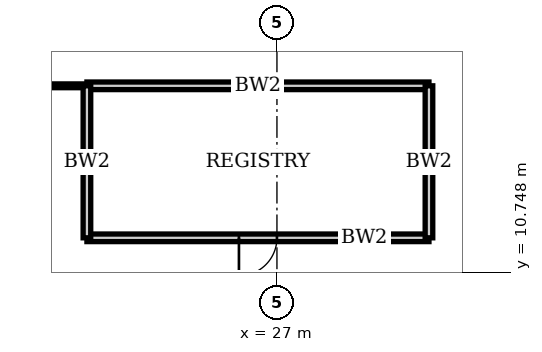
"""IFC4 building model, lengths in metres.
Left out: names, types, materials, properties, quantities, classifications, styles, units other than length and angle.
Written with IfcOpenShell. Run it as: python <this file> out.ifc"""

import sys

from ifc_helpers import new_model, si_unit, direction, frame, frame_2d, origin, place, context, subcontext, project, spatial, rectangle, extrude, element, fill, save


model = new_model("IFC4")
c1 = context("Model", 3, precision=1e-05, world=origin(), true_north=direction((0.0, 1.0)))
c2 = subcontext(c1, "Body", "Model", "MODEL_VIEW")
j1 = project(units=[si_unit("LENGTHUNIT", "METRE"), si_unit("PLANEANGLEUNIT", "RADIAN")], contexts=[c1])
p1 = place(None, origin())
s1 = spatial("IfcSite", under=j1, at=p1, CompositionType="ELEMENT")
p2 = place(p1, origin())
s2 = spatial("IfcBuilding", under=s1, at=p2, CompositionType="ELEMENT")
p3 = place(p2, frame((0.0, 0.0, 23.8)))
s3 = spatial("IfcBuildingStorey", under=s2, at=p3, CompositionType="ELEMENT", Elevation=23.8)
p4 = place(p3, frame((22.0, 11.65, 0.0), z_axis=(0.0, 0.0, 1.0), x_axis=(1.0, 0.0, 0.0)))
e1 = element("IfcWall", 1, at=p4, inside=s3, PredefinedType="SOLIDWALL", context=c2, shape_type="SweptSolid", body=[
    extrude(rectangle(XDim=9.0, YDim=0.2, at=frame_2d((4.5, 0.0))), origin(), (0.0, 0.0, 1.0), 3.75),
])
p5 = place(p4, frame((4.0, 0.0, 0.0)))
e2 = element("IfcOpeningElement", 2, at=p5, cuts=e1, PredefinedType="OPENING", context=c2, shape_type="SweptSolid", body=[
    extrude(rectangle(XDim=1.0, YDim=2.4, at=frame_2d((0.5, 1.2))), frame((0.0, 0.11, 0.0), z_axis=(0.0, -1.0, 0.0), x_axis=(1.0, 0.0, 0.0)), (0.0, 0.0, 1.0), 0.22),
])
p6 = place(p3, frame((22.0, 15.65, 0.0), z_axis=(0.0, 0.0, 1.0), x_axis=(1.0, 0.0, 0.0)))
e3 = element("IfcWall", 3, at=p6, inside=s3, PredefinedType="SOLIDWALL", context=c2, shape_type="SweptSolid", body=[
    extrude(rectangle(XDim=9.0, YDim=0.2, at=frame_2d((4.5, 0.0))), origin(), (0.0, 0.0, 1.0), 3.75),
])
p7 = place(p3, frame((18.0, 15.65, 0.0), z_axis=(0.0, 0.0, 1.0), x_axis=(1.0, 0.0, 0.0)))
e4 = element("IfcWall", 4, at=p7, inside=s3, PredefinedType="PARTITIONING", context=c2, shape_type="SweptSolid", body=[
    extrude(rectangle(XDim=4.0, YDim=0.1, at=frame_2d((2.0, 0.0))), origin(), (0.0, 0.0, 1.0), 3.75),
])
for number, where, z_axis, x_axis in (
    (5, (22.0, 11.65, 0.0), (0.0, 0.0, 1.0), (0.0, 1.0, 0.0)),
    (6, (31.0, 11.65, 0.0), (0.0, 0.0, 1.0), (0.0, 1.0, 0.0)),
):
    element("IfcWall", number, at=place(p3, frame(where, z_axis=z_axis, x_axis=x_axis)), inside=s3, PredefinedType="SOLIDWALL", context=c2, shape_type="SweptSolid", body=[
        extrude(rectangle(XDim=4.0, YDim=0.2, at=frame_2d((2.0, 0.0))), origin(), (0.0, 0.0, 1.0), 3.75),
    ])
p8 = place(p5, origin())
e7 = element("IfcDoor", 7, at=p8, inside=s3, OperationType="SINGLE_SWING_LEFT", PredefinedType="DOOR", context=c2, shape_type="SweptSolid", body=[
    extrude(rectangle(XDim=1.0, YDim=2.4, at=frame_2d((0.5, 1.2))), frame((0.0, 0.035, 0.0), z_axis=(0.0, -1.0, 0.0), x_axis=(1.0, 0.0, 0.0)), (0.0, 0.0, 1.0), 0.07),
])
fill(e2, e7)
save(model, sys.argv[1])
